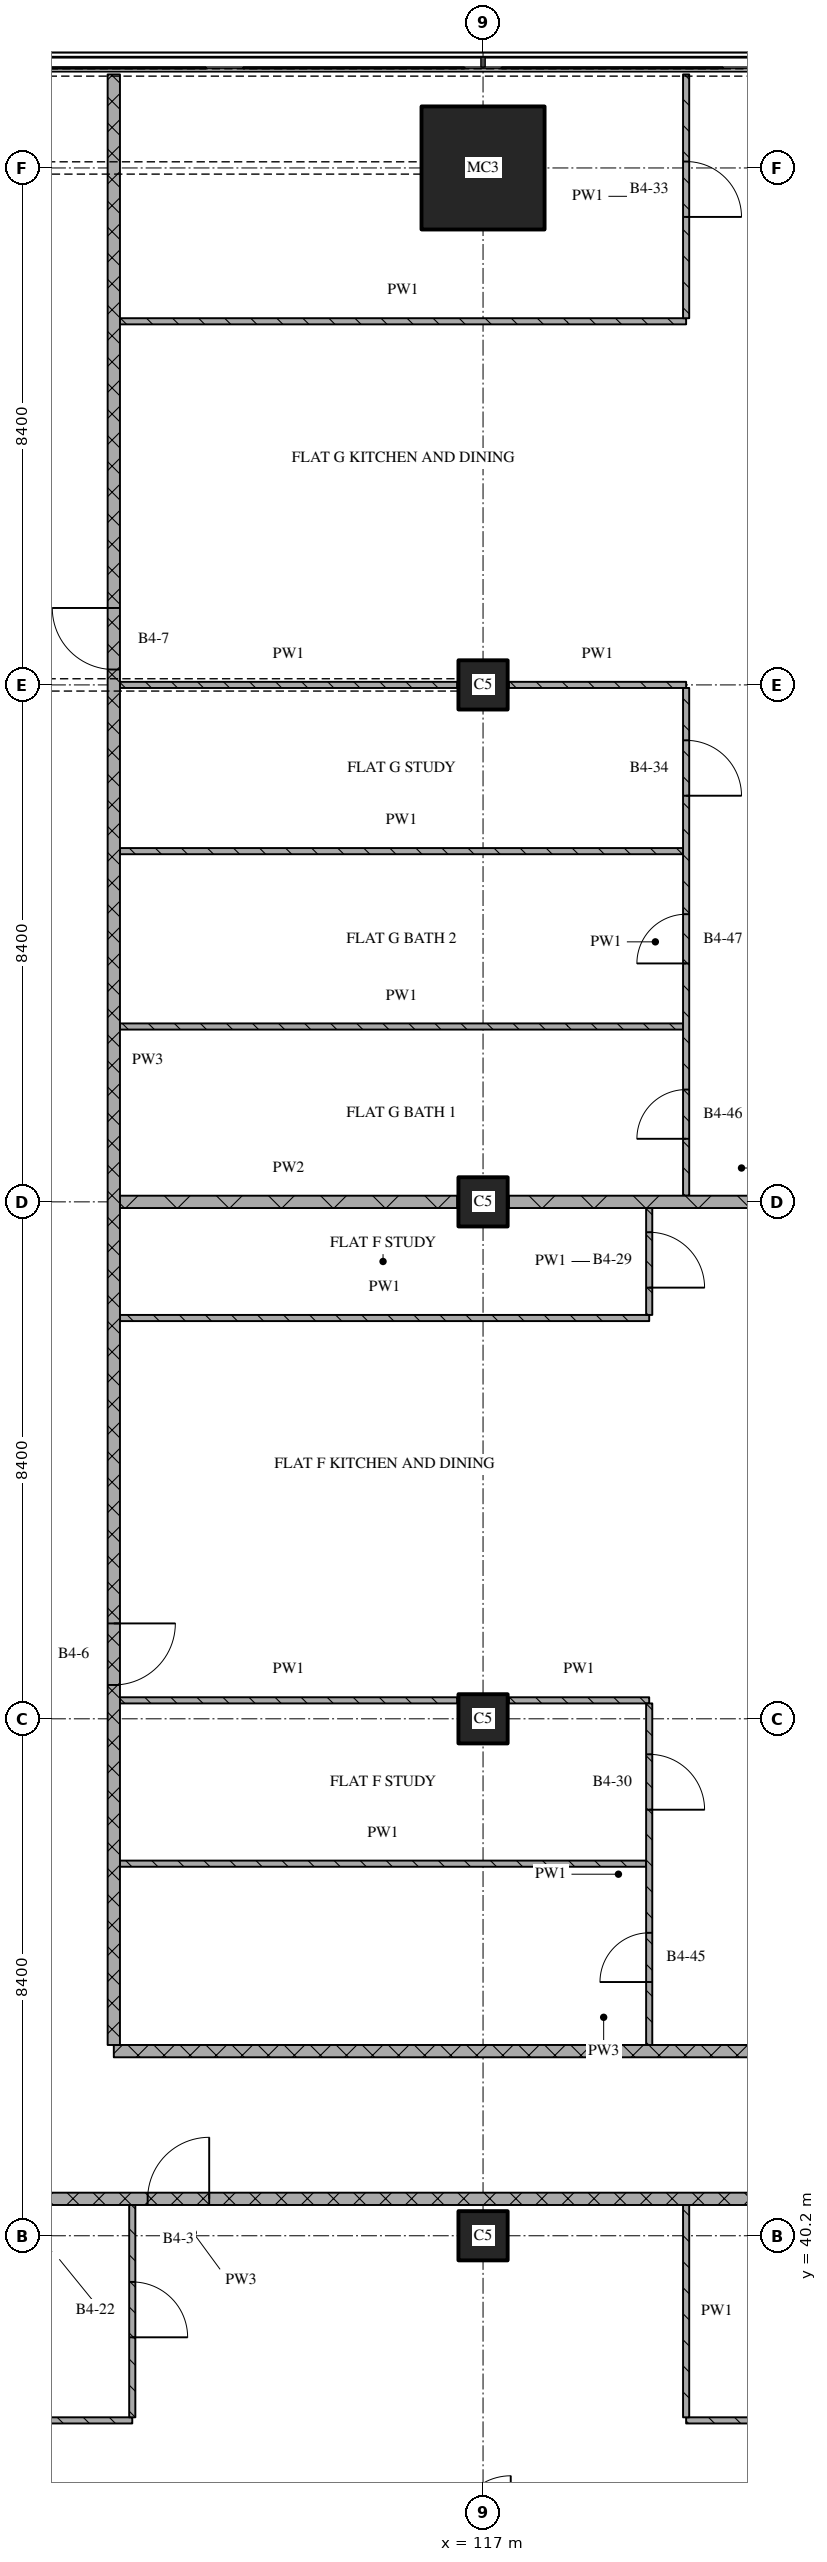
"""IFC4 building model, lengths in metres.
Left out: names, types, materials, properties, quantities, classifications, styles, units other than length and angle.
Written with IfcOpenShell. Run it as: python <this file> out.ifc"""

import sys

from ifc_helpers import new_model, si_unit, direction, frame, frame_2d, origin, origin_2d, place, context, subcontext, project, spatial, rectangle, extrude, element, fill, save


model = new_model("IFC4")
c1 = context("Model", 3, precision=1e-05, world=origin(), true_north=direction((0.0, 1.0)))
c2 = subcontext(c1, "Body", "Model", "MODEL_VIEW")
j1 = project(units=[si_unit("LENGTHUNIT", "METRE"), si_unit("PLANEANGLEUNIT", "RADIAN")], contexts=[c1])
p1 = place(None, origin())
s1 = spatial("IfcSite", under=j1, at=p1, CompositionType="ELEMENT")
p2 = place(p1, origin())
s2 = spatial("IfcBuilding", under=s1, at=p2, CompositionType="ELEMENT")
p3 = place(p2, frame((0.0, 0.0, 134.85)))
s3 = spatial("IfcBuildingStorey", under=s2, at=p3, CompositionType="ELEMENT", Elevation=134.85)
for number, where, z_axis, x_axis in (
    (1, (117.0, 40.2, 0.0), (0.0, 0.0, 1.0), (1.0, 0.0, 0.0)),
    (2, (117.0, 48.6, 0.0), (0.0, 0.0, 1.0), (1.0, 0.0, 0.0)),
    (3, (117.0, 57.0, 0.0), (0.0, 0.0, 1.0), (1.0, 0.0, 0.0)),
    (4, (117.0, 65.4, 0.0), (0.0, 0.0, 1.0), (1.0, 0.0, 0.0)),
):
    element("IfcColumn", number, at=place(p3, frame(where, z_axis=z_axis, x_axis=x_axis)), inside=s3, PredefinedType="COLUMN", context=c2, shape_type="SweptSolid", body=[
        extrude(rectangle(XDim=0.8, YDim=0.8, at=origin_2d()), origin(), (0.0, 0.0, 1.0), 3.6),
    ])
p4 = place(p3, frame((117.0, 73.8, 0.0), z_axis=(0.0, 0.0, 1.0), x_axis=(1.0, 0.0, 0.0)))
e5 = element("IfcColumn", 5, at=p4, inside=s3, PredefinedType="COLUMN", context=c2, shape_type="SweptSolid", body=[
    extrude(rectangle(XDim=2.0, YDim=2.0, at=origin_2d()), origin(), (0.0, 0.0, 1.0), 3.6),
])
p5 = place(p3, frame((100.3, 37.2, 0.0), z_axis=(0.0, 0.0, 1.0), x_axis=(1.0, 0.0, 0.0)))
e6 = element("IfcWall", 6, at=p5, inside=s3, PredefinedType="PARTITIONING", context=c2, shape_type="SweptSolid", body=[
    extrude(rectangle(XDim=11.0, YDim=0.1, at=frame_2d((5.5, 0.0))), origin(), (0.0, 0.0, 1.0), 3.32),
])
p6 = place(p5, frame((1.75, 0.0, 0.0)))
e7 = element("IfcOpeningElement", 7, at=p6, cuts=e6, PredefinedType="OPENING", context=c2, shape_type="SweptSolid", body=[
    extrude(rectangle(XDim=0.8, YDim=2.1, at=frame_2d((0.4, 1.05))), frame((0.0, 0.06, 0.0), z_axis=(0.0, -1.0, 0.0), x_axis=(1.0, 0.0, 0.0)), (0.0, 0.0, 1.0), 0.12),
])
p7 = place(p5, frame((6.25, 0.0, 0.0)))
e8 = element("IfcOpeningElement", 8, at=p7, cuts=e6, PredefinedType="OPENING", context=c2, shape_type="SweptSolid", body=[
    extrude(rectangle(XDim=0.8, YDim=2.1, at=frame_2d((0.4, 1.05))), frame((0.0, 0.06, 0.0), z_axis=(0.0, -1.0, 0.0), x_axis=(1.0, 0.0, 0.0)), (0.0, 0.0, 1.0), 0.12),
])
p8 = place(p3, frame((120.3, 37.2, 0.0), z_axis=(0.0, 0.0, 1.0), x_axis=(1.0, 0.0, 0.0)))
e9 = element("IfcWall", 9, at=p8, inside=s3, PredefinedType="PARTITIONING", context=c2, shape_type="SweptSolid", body=[
    extrude(rectangle(XDim=6.62, YDim=0.1, at=frame_2d((3.31, 0.0))), origin(), (0.0, 0.0, 1.0), 3.32),
])
p9 = place(p8, frame((3.0, 0.0, 0.0)))
e10 = element("IfcOpeningElement", 10, at=p9, cuts=e9, PredefinedType="OPENING", context=c2, shape_type="SweptSolid", body=[
    extrude(rectangle(XDim=0.9, YDim=2.1, at=frame_2d((0.45, 1.05))), frame((0.0, 0.06, 0.0), z_axis=(0.0, -1.0, 0.0), x_axis=(1.0, 0.0, 0.0)), (0.0, 0.0, 1.0), 0.12),
])
p10 = place(p3, frame((124.38, 40.8, 0.0), z_axis=(0.0, 0.0, 1.0), x_axis=(-1.0, 0.0, 0.0)))
e11 = element("IfcWall", 11, at=p10, inside=s3, PredefinedType="PARTITIONING", context=c2, shape_type="SweptSolid", body=[
    extrude(rectangle(XDim=24.18, YDim=0.2, at=frame_2d((12.09, 0.0))), origin(), (0.0, 0.0, 1.0), 3.32),
])
p11 = place(p10, frame((11.83, 0.0, 0.0)))
e12 = element("IfcOpeningElement", 12, at=p11, cuts=e11, PredefinedType="OPENING", context=c2, shape_type="SweptSolid", body=[
    extrude(rectangle(XDim=1.0, YDim=2.1, at=frame_2d((0.5, 1.05))), frame((0.0, 0.11, 0.0), z_axis=(0.0, -1.0, 0.0), x_axis=(1.0, 0.0, 0.0)), (0.0, 0.0, 1.0), 0.22),
])
p12 = place(p3, frame((111.0, 43.2, 0.0), z_axis=(0.0, 0.0, 1.0), x_axis=(1.0, 0.0, 0.0)))
e13 = element("IfcWall", 13, at=p12, inside=s3, PredefinedType="PARTITIONING", context=c2, shape_type="SweptSolid", body=[
    extrude(rectangle(XDim=15.92, YDim=0.2, at=frame_2d((7.96, 0.0))), origin(), (0.0, 0.0, 1.0), 3.32),
])
p13 = place(p3, frame((111.1, 46.246, 0.0), z_axis=(0.0, 0.0, 1.0), x_axis=(1.0, 0.0, 0.0)))
e14 = element("IfcWall", 14, at=p13, inside=s3, PredefinedType="PARTITIONING", context=c2, shape_type="SweptSolid", body=[
    extrude(rectangle(XDim=8.55, YDim=0.1, at=frame_2d((4.275, 0.0))), origin(), (0.0, 0.0, 1.0), 3.32),
])
p14 = place(p3, frame((111.1, 48.9, 0.0), z_axis=(0.0, 0.0, 1.0), x_axis=(1.0, 0.0, 0.0)))
e15 = element("IfcWall", 15, at=p14, inside=s3, PredefinedType="PARTITIONING", context=c2, shape_type="SweptSolid", body=[
    extrude(rectangle(XDim=5.48, YDim=0.1, at=frame_2d((2.74, 0.0))), origin(), (0.0, 0.0, 1.0), 3.32),
])
p15 = place(p3, frame((117.42, 48.9, 0.0), z_axis=(0.0, 0.0, 1.0), x_axis=(1.0, 0.0, 0.0)))
e16 = element("IfcWall", 16, at=p15, inside=s3, PredefinedType="PARTITIONING", context=c2, shape_type="SweptSolid", body=[
    extrude(rectangle(XDim=2.28, YDim=0.1, at=frame_2d((1.14, 0.0))), origin(), (0.0, 0.0, 1.0), 3.32),
])
p16 = place(p3, frame((111.1, 55.113, 0.0), z_axis=(0.0, 0.0, 1.0), x_axis=(1.0, 0.0, 0.0)))
e17 = element("IfcWall", 17, at=p16, inside=s3, PredefinedType="PARTITIONING", context=c2, shape_type="SweptSolid", body=[
    extrude(rectangle(XDim=8.6, YDim=0.1, at=frame_2d((4.3, 0.0))), origin(), (0.0, 0.0, 1.0), 3.32),
])
p17 = place(p3, frame((111.1, 57.0, 0.0), z_axis=(0.0, 0.0, 1.0), x_axis=(1.0, 0.0, 0.0)))
e18 = element("IfcWall", 18, at=p17, inside=s3, PredefinedType="PARTITIONING", context=c2, shape_type="SweptSolid", body=[
    extrude(rectangle(XDim=5.48, YDim=0.2, at=frame_2d((2.74, 0.0))), origin(), (0.0, 0.0, 1.0), 3.32),
])
p18 = place(p3, frame((117.42, 57.0, 0.0), z_axis=(0.0, 0.0, 1.0), x_axis=(1.0, 0.0, 0.0)))
e19 = element("IfcWall", 19, at=p18, inside=s3, PredefinedType="PARTITIONING", context=c2, shape_type="SweptSolid", body=[
    extrude(rectangle(XDim=7.56, YDim=0.2, at=frame_2d((3.78, 0.0))), origin(), (0.0, 0.0, 1.0), 3.32),
])
for number, where, z_axis, x_axis in (
    (20, (111.1, 59.85, 0.0), (0.0, 0.0, 1.0), (1.0, 0.0, 0.0)),
    (21, (111.1, 62.699, 0.0), (0.0, 0.0, 1.0), (1.0, 0.0, 0.0)),
):
    element("IfcWall", number, at=place(p3, frame(where, z_axis=z_axis, x_axis=x_axis)), inside=s3, PredefinedType="PARTITIONING", context=c2, shape_type="SweptSolid", body=[
        extrude(rectangle(XDim=9.15, YDim=0.1, at=frame_2d((4.575, 0.0))), origin(), (0.0, 0.0, 1.0), 3.32),
    ])
p19 = place(p3, frame((111.1, 65.4, 0.0), z_axis=(0.0, 0.0, 1.0), x_axis=(1.0, 0.0, 0.0)))
e22 = element("IfcWall", 22, at=p19, inside=s3, PredefinedType="PARTITIONING", context=c2, shape_type="SweptSolid", body=[
    extrude(rectangle(XDim=5.48, YDim=0.1, at=frame_2d((2.74, 0.0))), origin(), (0.0, 0.0, 1.0), 2.82),
])
p20 = place(p3, frame((117.42, 65.4, 0.0), z_axis=(0.0, 0.0, 1.0), x_axis=(1.0, 0.0, 0.0)))
e23 = element("IfcWall", 23, at=p20, inside=s3, PredefinedType="PARTITIONING", context=c2, shape_type="SweptSolid", body=[
    extrude(rectangle(XDim=2.88, YDim=0.1, at=frame_2d((1.44, 0.0))), origin(), (0.0, 0.0, 1.0), 3.32),
])
p21 = place(p3, frame((111.1, 71.309, 0.0), z_axis=(0.0, 0.0, 1.0), x_axis=(1.0, 0.0, 0.0)))
e24 = element("IfcWall", 24, at=p21, inside=s3, PredefinedType="PARTITIONING", context=c2, shape_type="SweptSolid", body=[
    extrude(rectangle(XDim=9.2, YDim=0.1, at=frame_2d((4.6, 0.0))), origin(), (0.0, 0.0, 1.0), 3.32),
])
p22 = place(p3, frame((111.0, 75.32, 0.0), z_axis=(0.0, 0.0, 1.0), x_axis=(0.0, -1.0, 0.0)))
e25 = element("IfcWall", 25, at=p22, inside=s3, PredefinedType="PARTITIONING", context=c2, shape_type="SweptSolid", body=[
    extrude(rectangle(XDim=32.02, YDim=0.2, at=frame_2d((16.01, 0.0))), origin(), (0.0, 0.0, 1.0), 3.32),
])
p23 = place(p22, frame((8.67, 0.0, 0.0)))
e26 = element("IfcOpeningElement", 26, at=p23, cuts=e25, PredefinedType="OPENING", context=c2, shape_type="SweptSolid", body=[
    extrude(rectangle(XDim=1.0, YDim=2.1, at=frame_2d((0.5, 1.05))), frame((0.0, 0.11, 0.0), z_axis=(0.0, -1.0, 0.0), x_axis=(1.0, 0.0, 0.0)), (0.0, 0.0, 1.0), 0.22),
])
p24 = place(p22, frame((25.17, 0.0, 0.0)))
e27 = element("IfcOpeningElement", 27, at=p24, cuts=e25, PredefinedType="OPENING", context=c2, shape_type="SweptSolid", body=[
    extrude(rectangle(XDim=1.0, YDim=2.1, at=frame_2d((0.5, 1.05))), frame((0.0, 0.11, 0.0), z_axis=(0.0, -1.0, 0.0), x_axis=(1.0, 0.0, 0.0)), (0.0, 0.0, 1.0), 0.22),
])
p25 = place(p3, frame((111.3, 37.25, 0.0), z_axis=(0.0, 0.0, 1.0), x_axis=(0.0, 1.0, 0.0)))
e28 = element("IfcWall", 28, at=p25, inside=s3, PredefinedType="PARTITIONING", context=c2, shape_type="SweptSolid", body=[
    extrude(rectangle(XDim=3.45, YDim=0.1, at=frame_2d((1.725, 0.0))), origin(), (0.0, 0.0, 1.0), 3.32),
])
p26 = place(p25, frame((1.3, 0.0, 0.0)))
e29 = element("IfcOpeningElement", 29, at=p26, cuts=e28, PredefinedType="OPENING", context=c2, shape_type="SweptSolid", body=[
    extrude(rectangle(XDim=0.9, YDim=2.1, at=frame_2d((0.45, 1.05))), frame((0.0, 0.06, 0.0), z_axis=(0.0, -1.0, 0.0), x_axis=(1.0, 0.0, 0.0)), (0.0, 0.0, 1.0), 0.12),
])
p27 = place(p3, frame((119.7, 43.3, 0.0), z_axis=(0.0, 0.0, 1.0), x_axis=(0.0, 1.0, 0.0)))
e30 = element("IfcWall", 30, at=p27, inside=s3, PredefinedType="PARTITIONING", context=c2, shape_type="SweptSolid", body=[
    extrude(rectangle(XDim=5.55, YDim=0.1, at=frame_2d((2.775, 0.0))), origin(), (0.0, 0.0, 1.0), 3.32),
])
p28 = place(p27, frame((1.023, 0.0, 0.0)))
e31 = element("IfcOpeningElement", 31, at=p28, cuts=e30, PredefinedType="OPENING", context=c2, shape_type="SweptSolid", body=[
    extrude(rectangle(XDim=0.8, YDim=2.1, at=frame_2d((0.4, 1.05))), frame((0.0, 0.06, 0.0), z_axis=(0.0, -1.0, 0.0), x_axis=(1.0, 0.0, 0.0)), (0.0, 0.0, 1.0), 0.12),
])
p29 = place(p27, frame((3.823, 0.0, 0.0)))
e32 = element("IfcOpeningElement", 32, at=p29, cuts=e30, PredefinedType="OPENING", context=c2, shape_type="SweptSolid", body=[
    extrude(rectangle(XDim=0.9, YDim=2.1, at=frame_2d((0.45, 1.05))), frame((0.0, 0.06, 0.0), z_axis=(0.0, -1.0, 0.0), x_axis=(1.0, 0.0, 0.0)), (0.0, 0.0, 1.0), 0.12),
])
p30 = place(p3, frame((119.7, 55.163, 0.0), z_axis=(0.0, 0.0, 1.0), x_axis=(0.0, 1.0, 0.0)))
e33 = element("IfcWall", 33, at=p30, inside=s3, PredefinedType="PARTITIONING", context=c2, shape_type="SweptSolid", body=[
    extrude(rectangle(XDim=1.737, YDim=0.1, at=frame_2d((0.869, 0.0))), origin(), (0.0, 0.0, 1.0), 3.32),
])
p31 = place(p30, frame((0.444, 0.0, 0.0)))
e34 = element("IfcOpeningElement", 34, at=p31, cuts=e33, PredefinedType="OPENING", context=c2, shape_type="SweptSolid", body=[
    extrude(rectangle(XDim=0.9, YDim=2.1, at=frame_2d((0.45, 1.05))), frame((0.0, 0.06, 0.0), z_axis=(0.0, -1.0, 0.0), x_axis=(1.0, 0.0, 0.0)), (0.0, 0.0, 1.0), 0.12),
])
p32 = place(p3, frame((120.3, 40.7, 0.0), z_axis=(0.0, 0.0, 1.0), x_axis=(0.0, -1.0, 0.0)))
e35 = element("IfcWall", 35, at=p32, inside=s3, PredefinedType="PARTITIONING", context=c2, shape_type="SweptSolid", body=[
    extrude(rectangle(XDim=3.45, YDim=0.1, at=frame_2d((1.725, 0.0))), origin(), (0.0, 0.0, 1.0), 3.32),
])
p33 = place(p3, frame((120.3, 57.1, 0.0), z_axis=(0.0, 0.0, 1.0), x_axis=(0.0, 1.0, 0.0)))
e36 = element("IfcWall", 36, at=p33, inside=s3, PredefinedType="PARTITIONING", context=c2, shape_type="SweptSolid", body=[
    extrude(rectangle(XDim=8.25, YDim=0.1, at=frame_2d((4.125, 0.0))), origin(), (0.0, 0.0, 1.0), 3.32),
])
p34 = place(p33, frame((0.925, 0.0, 0.0)))
e37 = element("IfcOpeningElement", 37, at=p34, cuts=e36, PredefinedType="OPENING", context=c2, shape_type="SweptSolid", body=[
    extrude(rectangle(XDim=0.8, YDim=2.1, at=frame_2d((0.4, 1.05))), frame((0.0, 0.06, 0.0), z_axis=(0.0, -1.0, 0.0), x_axis=(1.0, 0.0, 0.0)), (0.0, 0.0, 1.0), 0.12),
])
p35 = place(p33, frame((3.774, 0.0, 0.0)))
e38 = element("IfcOpeningElement", 38, at=p35, cuts=e36, PredefinedType="OPENING", context=c2, shape_type="SweptSolid", body=[
    extrude(rectangle(XDim=0.8, YDim=2.1, at=frame_2d((0.4, 1.05))), frame((0.0, 0.06, 0.0), z_axis=(0.0, -1.0, 0.0), x_axis=(1.0, 0.0, 0.0)), (0.0, 0.0, 1.0), 0.12),
])
p36 = place(p33, frame((6.5, 0.0, 0.0)))
e39 = element("IfcOpeningElement", 39, at=p36, cuts=e36, PredefinedType="OPENING", context=c2, shape_type="SweptSolid", body=[
    extrude(rectangle(XDim=0.9, YDim=2.1, at=frame_2d((0.45, 1.05))), frame((0.0, 0.06, 0.0), z_axis=(0.0, -1.0, 0.0), x_axis=(1.0, 0.0, 0.0)), (0.0, 0.0, 1.0), 0.12),
])
p37 = place(p3, frame((120.3, 71.359, 0.0), z_axis=(0.0, 0.0, 1.0), x_axis=(0.0, 1.0, 0.0)))
e40 = element("IfcWall", 40, at=p37, inside=s3, PredefinedType="PARTITIONING", context=c2, shape_type="SweptSolid", body=[
    extrude(rectangle(XDim=3.961, YDim=0.1, at=frame_2d((1.981, 0.0))), origin(), (0.0, 0.0, 1.0), 3.32),
])
p38 = place(p37, frame((1.646, 0.0, 0.0)))
e41 = element("IfcOpeningElement", 41, at=p38, cuts=e40, PredefinedType="OPENING", context=c2, shape_type="SweptSolid", body=[
    extrude(rectangle(XDim=0.9, YDim=2.1, at=frame_2d((0.45, 1.05))), frame((0.0, 0.06, 0.0), z_axis=(0.0, -1.0, 0.0), x_axis=(1.0, 0.0, 0.0)), (0.0, 0.0, 1.0), 0.12),
])
p39 = place(p11, origin())
e42 = element("IfcDoor", 42, at=p39, inside=s3, OperationType="SINGLE_SWING_RIGHT", PredefinedType="DOOR", context=c2, shape_type="SweptSolid", body=[
    extrude(rectangle(XDim=1.0, YDim=2.1, at=frame_2d((0.5, 1.05))), frame((0.0, 0.025, 0.0), z_axis=(0.0, -1.0, 0.0), x_axis=(1.0, 0.0, 0.0)), (0.0, 0.0, 1.0), 0.05),
])
fill(e12, e42)
p40 = place(p23, origin())
e43 = element("IfcDoor", 43, at=p40, inside=s3, OperationType="SINGLE_SWING_RIGHT", PredefinedType="DOOR", context=c2, shape_type="SweptSolid", body=[
    extrude(rectangle(XDim=1.0, YDim=2.1, at=frame_2d((0.5, 1.05))), frame((0.0, 0.025, 0.0), z_axis=(0.0, -1.0, 0.0), x_axis=(1.0, 0.0, 0.0)), (0.0, 0.0, 1.0), 0.05),
])
fill(e26, e43)
p41 = place(p24, origin())
e44 = element("IfcDoor", 44, at=p41, inside=s3, OperationType="SINGLE_SWING_LEFT", PredefinedType="DOOR", context=c2, shape_type="SweptSolid", body=[
    extrude(rectangle(XDim=1.0, YDim=2.1, at=frame_2d((0.5, 1.05))), frame((0.0, 0.025, 0.0), z_axis=(0.0, -1.0, 0.0), x_axis=(1.0, 0.0, 0.0)), (0.0, 0.0, 1.0), 0.05),
])
fill(e27, e44)
p42 = place(p26, origin())
e45 = element("IfcDoor", 45, at=p42, inside=s3, OperationType="SINGLE_SWING_RIGHT", PredefinedType="DOOR", context=c2, shape_type="SweptSolid", body=[
    extrude(rectangle(XDim=0.9, YDim=2.1, at=frame_2d((0.45, 1.05))), frame((0.0, 0.025, 0.0), z_axis=(0.0, -1.0, 0.0), x_axis=(1.0, 0.0, 0.0)), (0.0, 0.0, 1.0), 0.05),
])
fill(e29, e45)
p43 = place(p28, origin())
e46 = element("IfcDoor", 46, at=p43, inside=s3, OperationType="SINGLE_SWING_LEFT", PredefinedType="DOOR", context=c2, shape_type="SweptSolid", body=[
    extrude(rectangle(XDim=0.8, YDim=2.1, at=frame_2d((0.4, 1.05))), frame((0.0, 0.025, 0.0), z_axis=(0.0, -1.0, 0.0), x_axis=(1.0, 0.0, 0.0)), (0.0, 0.0, 1.0), 0.05),
])
fill(e31, e46)
p44 = place(p29, origin())
e47 = element("IfcDoor", 47, at=p44, inside=s3, OperationType="SINGLE_SWING_RIGHT", PredefinedType="DOOR", context=c2, shape_type="SweptSolid", body=[
    extrude(rectangle(XDim=0.9, YDim=2.1, at=frame_2d((0.45, 1.05))), frame((0.0, 0.025, 0.0), z_axis=(0.0, -1.0, 0.0), x_axis=(1.0, 0.0, 0.0)), (0.0, 0.0, 1.0), 0.05),
])
fill(e32, e47)
p45 = place(p31, origin())
e48 = element("IfcDoor", 48, at=p45, inside=s3, OperationType="SINGLE_SWING_RIGHT", PredefinedType="DOOR", context=c2, shape_type="SweptSolid", body=[
    extrude(rectangle(XDim=0.9, YDim=2.1, at=frame_2d((0.45, 1.05))), frame((0.0, 0.025, 0.0), z_axis=(0.0, -1.0, 0.0), x_axis=(1.0, 0.0, 0.0)), (0.0, 0.0, 1.0), 0.05),
])
fill(e34, e48)
p46 = place(p34, origin())
e49 = element("IfcDoor", 49, at=p46, inside=s3, OperationType="SINGLE_SWING_LEFT", PredefinedType="DOOR", context=c2, shape_type="SweptSolid", body=[
    extrude(rectangle(XDim=0.8, YDim=2.1, at=frame_2d((0.4, 1.05))), frame((0.0, 0.025, 0.0), z_axis=(0.0, -1.0, 0.0), x_axis=(1.0, 0.0, 0.0)), (0.0, 0.0, 1.0), 0.05),
])
fill(e37, e49)
p47 = place(p35, origin())
e50 = element("IfcDoor", 50, at=p47, inside=s3, OperationType="SINGLE_SWING_LEFT", PredefinedType="DOOR", context=c2, shape_type="SweptSolid", body=[
    extrude(rectangle(XDim=0.8, YDim=2.1, at=frame_2d((0.4, 1.05))), frame((0.0, 0.025, 0.0), z_axis=(0.0, -1.0, 0.0), x_axis=(1.0, 0.0, 0.0)), (0.0, 0.0, 1.0), 0.05),
])
fill(e38, e50)
p48 = place(p36, origin())
e51 = element("IfcDoor", 51, at=p48, inside=s3, OperationType="SINGLE_SWING_RIGHT", PredefinedType="DOOR", context=c2, shape_type="SweptSolid", body=[
    extrude(rectangle(XDim=0.9, YDim=2.1, at=frame_2d((0.45, 1.05))), frame((0.0, 0.025, 0.0), z_axis=(0.0, -1.0, 0.0), x_axis=(1.0, 0.0, 0.0)), (0.0, 0.0, 1.0), 0.05),
])
fill(e39, e51)
p49 = place(p38, origin())
e52 = element("IfcDoor", 52, at=p49, inside=s3, OperationType="SINGLE_SWING_RIGHT", PredefinedType="DOOR", context=c2, shape_type="SweptSolid", body=[
    extrude(rectangle(XDim=0.9, YDim=2.1, at=frame_2d((0.45, 1.05))), frame((0.0, 0.025, 0.0), z_axis=(0.0, -1.0, 0.0), x_axis=(1.0, 0.0, 0.0)), (0.0, 0.0, 1.0), 0.05),
])
fill(e41, e52)
save(model, sys.argv[1])
